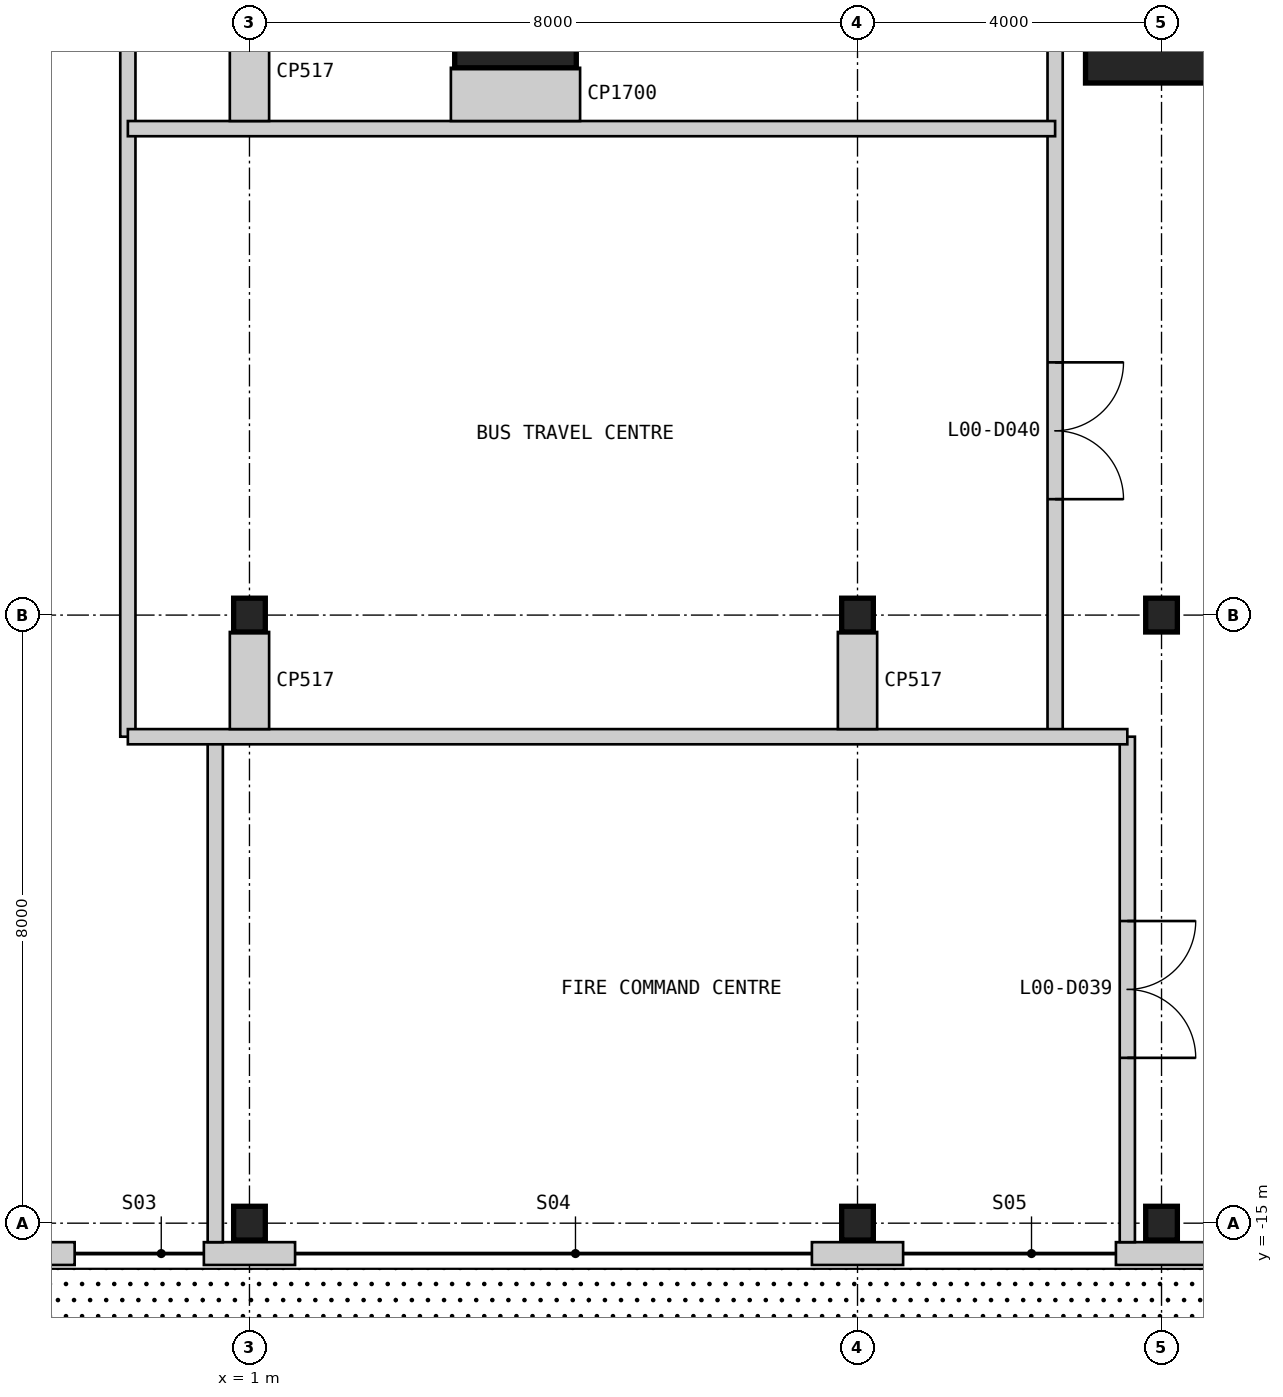
"""IFC4 building model, lengths in metres.
Left out: names, types, materials, properties, quantities, classifications, styles, units other than length and angle.
Written with IfcOpenShell. Run it as: python <this file> out.ifc"""

import sys

from ifc_helpers import new_model, si_unit, direction, frame, frame_2d, origin, origin_2d, place, context, subcontext, project, spatial, rectangle, i_section, extrude, element, fill, save


model = new_model("IFC4")
c1 = context("Model", 3, precision=1e-05, world=origin(), true_north=direction((0.0, 1.0)))
c2 = subcontext(c1, "Body", "Model", "MODEL_VIEW")
j1 = project(units=[si_unit("LENGTHUNIT", "METRE"), si_unit("PLANEANGLEUNIT", "RADIAN")], contexts=[c1])
p1 = place(None, origin())
s1 = spatial("IfcSite", under=j1, at=p1, CompositionType="ELEMENT")
p2 = place(p1, origin())
s2 = spatial("IfcBuilding", under=s1, at=p2, CompositionType="ELEMENT")
p3 = place(p2, origin())
s3 = spatial("IfcBuildingStorey", under=s2, at=p3, CompositionType="ELEMENT", Elevation=0.0)
p4 = place(p3, frame((4.5, 1.0, 0.0), z_axis=(0.0, 0.0, 1.0), x_axis=(1.0, 0.0, 0.0)))
e1 = element("IfcColumn", 1, at=p4, inside=s3, PredefinedType="COLUMN", context=c2, shape_type="SweptSolid", body=[
    extrude(rectangle(XDim=1.6, YDim=1.6, at=origin_2d()), origin(), (0.0, 0.0, 1.0), 7.0),
])
p5 = place(p3, frame((13.0, 1.0, 0.0), z_axis=(0.0, 0.0, 1.0), x_axis=(1.0, 0.0, 0.0)))
e2 = element("IfcColumn", 2, at=p5, inside=s3, PredefinedType="COLUMN", context=c2, shape_type="SweptSolid", body=[
    extrude(rectangle(XDim=2.0, YDim=2.0, at=origin_2d()), origin(), (0.0, 0.0, 1.0), 7.0),
])
p6 = place(p3, frame((1.0, -15.0, -0.3), z_axis=(0.0, 0.0, 1.0), x_axis=(1.0, 0.0, 0.0)))
e3 = element("IfcColumn", 3, at=p6, inside=s3, PredefinedType="COLUMN", context=c2, shape_type="SweptSolid", body=[
    extrude(i_section(OverallWidth=0.417, OverallDepth=0.445, WebThickness=0.039, FlangeThickness=0.063, at=origin_2d()), origin(), (0.0, 0.0, 1.0), 7.3),
])
p7 = place(p3, frame((1.0, -7.0, 0.0), z_axis=(0.0, 0.0, 1.0), x_axis=(1.0, 0.0, 0.0)))
e4 = element("IfcColumn", 4, at=p7, inside=s3, PredefinedType="COLUMN", context=c2, shape_type="SweptSolid", body=[
    extrude(i_section(OverallWidth=0.417, OverallDepth=0.445, WebThickness=0.039, FlangeThickness=0.063, at=origin_2d()), origin(), (0.0, 0.0, 1.0), 7.0),
])
p8 = place(p3, frame((9.0, -15.0, -0.3), z_axis=(0.0, 0.0, 1.0), x_axis=(1.0, 0.0, 0.0)))
e5 = element("IfcColumn", 5, at=p8, inside=s3, PredefinedType="COLUMN", context=c2, shape_type="SweptSolid", body=[
    extrude(i_section(OverallWidth=0.417, OverallDepth=0.445, WebThickness=0.039, FlangeThickness=0.063, at=origin_2d()), origin(), (0.0, 0.0, 1.0), 7.3),
])
p9 = place(p3, frame((9.0, -7.0, 0.0), z_axis=(0.0, 0.0, 1.0), x_axis=(1.0, 0.0, 0.0)))
e6 = element("IfcColumn", 6, at=p9, inside=s3, PredefinedType="COLUMN", context=c2, shape_type="SweptSolid", body=[
    extrude(i_section(OverallWidth=0.417, OverallDepth=0.445, WebThickness=0.039, FlangeThickness=0.063, at=origin_2d()), origin(), (0.0, 0.0, 1.0), 7.0),
])
p10 = place(p3, frame((13.0, -15.0, -0.3), z_axis=(0.0, 0.0, 1.0), x_axis=(1.0, 0.0, 0.0)))
e7 = element("IfcColumn", 7, at=p10, inside=s3, PredefinedType="COLUMN", context=c2, shape_type="SweptSolid", body=[
    extrude(i_section(OverallWidth=0.417, OverallDepth=0.445, WebThickness=0.039, FlangeThickness=0.063, at=origin_2d()), origin(), (0.0, 0.0, 1.0), 7.3),
])
p11 = place(p3, frame((13.0, -7.0, 0.0), z_axis=(0.0, 0.0, 1.0), x_axis=(1.0, 0.0, 0.0)))
e8 = element("IfcColumn", 8, at=p11, inside=s3, PredefinedType="COLUMN", context=c2, shape_type="SweptSolid", body=[
    extrude(i_section(OverallWidth=0.417, OverallDepth=0.445, WebThickness=0.039, FlangeThickness=0.063, at=origin_2d()), origin(), (0.0, 0.0, 1.0), 7.0),
])
p12 = place(p3, frame((-4.7, -15.4, 0.0), z_axis=(0.0, 0.0, 1.0), x_axis=(1.0, 0.0, 0.0)))
e9 = element("IfcWall", 9, at=p12, inside=s3, PredefinedType="SOLIDWALL", context=c2, shape_type="SweptSolid", body=[
    extrude(rectangle(XDim=3.4, YDim=0.3, at=frame_2d((1.7, 0.0))), origin(), (0.0, 0.0, 1.0), 6.7),
])
p13 = place(p12, frame((0.7, 0.0, 0.0)))
e10 = element("IfcOpeningElement", 10, at=p13, cuts=e9, PredefinedType="OPENING", context=c2, shape_type="SweptSolid", body=[
    extrude(rectangle(XDim=2.0, YDim=3.0, at=frame_2d((1.0, 1.5))), frame((0.0, 0.16, 0.0), z_axis=(0.0, -1.0, 0.0), x_axis=(1.0, 0.0, 0.0)), (0.0, 0.0, 1.0), 0.32),
])
for number, where, z_axis, x_axis in (
    (11, (0.4, -15.4, 0.0), (0.0, 0.0, 1.0), (1.0, 0.0, 0.0)),
    (12, (8.4, -15.4, 0.0), (0.0, 0.0, 1.0), (1.0, 0.0, 0.0)),
    (13, (12.4, -15.4, 0.0), (0.0, 0.0, 1.0), (1.0, 0.0, 0.0)),
):
    element("IfcWall", number, at=place(p3, frame(where, z_axis=z_axis, x_axis=x_axis)), inside=s3, PredefinedType="SOLIDWALL", context=c2, shape_type="SweptSolid", body=[
        extrude(rectangle(XDim=1.2, YDim=0.3, at=frame_2d((0.6, 0.0))), origin(), (0.0, 0.0, 1.0), 6.7),
    ])
p14 = place(p3, frame((-0.6, -8.6, 0.0), z_axis=(0.0, 0.0, 1.0), x_axis=(0.0, 1.0, 0.0)))
e14 = element("IfcWall", 14, at=p14, inside=s3, PredefinedType="PARTITIONING", context=c2, shape_type="SweptSolid", body=[
    extrude(rectangle(XDim=20.2, YDim=0.2, at=frame_2d((10.1, 0.0))), origin(), (0.0, 0.0, 1.0), 6.7),
])
p15 = place(p3, frame((0.55, -15.25, 0.0), z_axis=(0.0, 0.0, 1.0), x_axis=(0.0, 1.0, 0.0)))
e15 = element("IfcWall", 15, at=p15, inside=s3, PredefinedType="PARTITIONING", context=c2, shape_type="SweptSolid", body=[
    extrude(rectangle(XDim=6.65, YDim=0.2, at=frame_2d((3.325, 0.0))), origin(), (0.0, 0.0, 1.0), 6.7),
])
p16 = place(p3, frame((11.6, -8.6, 0.0), z_axis=(0.0, 0.0, 1.0), x_axis=(0.0, 1.0, 0.0)))
e16 = element("IfcWall", 16, at=p16, inside=s3, PredefinedType="PARTITIONING", context=c2, shape_type="SweptSolid", body=[
    extrude(rectangle(XDim=15.6, YDim=0.2, at=frame_2d((7.8, 0.0))), origin(), (0.0, 0.0, 1.0), 6.7),
])
p17 = place(p16, frame((3.125, 0.0, 0.0)))
e17 = element("IfcOpeningElement", 17, at=p17, cuts=e16, PredefinedType="OPENING", context=c2, shape_type="SweptSolid", body=[
    extrude(rectangle(XDim=1.8, YDim=2.4, at=frame_2d((0.9, 1.2))), frame((0.0, 0.11, 0.0), z_axis=(0.0, -1.0, 0.0), x_axis=(1.0, 0.0, 0.0)), (0.0, 0.0, 1.0), 0.22),
])
p18 = place(p16, frame((10.45, 0.0, 0.0)))
e18 = element("IfcOpeningElement", 18, at=p18, cuts=e16, PredefinedType="OPENING", context=c2, shape_type="SweptSolid", body=[
    extrude(rectangle(XDim=0.9, YDim=2.2, at=frame_2d((0.45, 1.1))), frame((0.0, 0.11, 0.0), z_axis=(0.0, -1.0, 0.0), x_axis=(1.0, 0.0, 0.0)), (0.0, 0.0, 1.0), 0.22),
])
p19 = place(p16, frame((13.225, 0.0, 0.0)))
e19 = element("IfcOpeningElement", 19, at=p19, cuts=e16, PredefinedType="OPENING", context=c2, shape_type="SweptSolid", body=[
    extrude(rectangle(XDim=0.9, YDim=2.2, at=frame_2d((0.45, 1.1))), frame((0.0, 0.11, 0.0), z_axis=(0.0, -1.0, 0.0), x_axis=(1.0, 0.0, 0.0)), (0.0, 0.0, 1.0), 0.22),
])
p20 = place(p3, frame((12.55, -15.25, 0.0), z_axis=(0.0, 0.0, 1.0), x_axis=(0.0, 1.0, 0.0)))
e20 = element("IfcWall", 20, at=p20, inside=s3, PredefinedType="PARTITIONING", context=c2, shape_type="SweptSolid", body=[
    extrude(rectangle(XDim=6.65, YDim=0.2, at=frame_2d((3.325, 0.0))), origin(), (0.0, 0.0, 1.0), 6.7),
])
p21 = place(p20, frame((2.425, 0.0, 0.0)))
e21 = element("IfcOpeningElement", 21, at=p21, cuts=e20, PredefinedType="OPENING", context=c2, shape_type="SweptSolid", body=[
    extrude(rectangle(XDim=1.8, YDim=2.4, at=frame_2d((0.9, 1.2))), frame((0.0, 0.11, 0.0), z_axis=(0.0, -1.0, 0.0), x_axis=(1.0, 0.0, 0.0)), (0.0, 0.0, 1.0), 0.22),
])
p22 = place(p3, frame((-0.6, -8.6, 0.0), z_axis=(0.0, 0.0, 1.0), x_axis=(1.0, 0.0, 0.0)))
e22 = element("IfcWall", 22, at=p22, inside=s3, PredefinedType="PARTITIONING", context=c2, shape_type="SweptSolid", body=[
    extrude(rectangle(XDim=13.15, YDim=0.2, at=frame_2d((6.575, 0.0))), origin(), (0.0, 0.0, 1.0), 6.7),
])
p23 = place(p3, frame((-0.6, -0.6, 0.0), z_axis=(0.0, 0.0, 1.0), x_axis=(1.0, 0.0, 0.0)))
e23 = element("IfcWall", 23, at=p23, inside=s3, PredefinedType="PARTITIONING", context=c2, shape_type="SweptSolid", body=[
    extrude(rectangle(XDim=12.2, YDim=0.2, at=frame_2d((6.1, 0.0))), origin(), (0.0, 0.0, 1.0), 6.7),
])
for number, where, z_axis, x_axis in (
    (24, (1.0, -8.5, 0.0), (0.0, 0.0, 1.0), (0.0, 1.0, 0.0)),
    (25, (9.0, -8.5, 0.0), (0.0, 0.0, 1.0), (0.0, 1.0, 0.0)),
):
    element("IfcWall", number, at=place(p3, frame(where, z_axis=z_axis, x_axis=x_axis)), inside=s3, PredefinedType="PARTITIONING", context=c2, shape_type="SweptSolid", body=[
        extrude(rectangle(XDim=1.278, YDim=0.517, at=frame_2d((0.639, 0.0))), origin(), (0.0, 0.0, 1.0), 5.954),
    ])
p24 = place(p3, frame((4.5, -0.5, 0.0), z_axis=(0.0, 0.0, 1.0), x_axis=(0.0, 1.0, 0.0)))
e26 = element("IfcWall", 26, at=p24, inside=s3, PredefinedType="PARTITIONING", context=c2, shape_type="SweptSolid", body=[
    extrude(rectangle(XDim=0.7, YDim=1.7, at=frame_2d((0.35, 0.0))), origin(), (0.0, 0.0, 1.0), 6.7),
])
p25 = place(p3, frame((1.0, -0.5, 0.0), z_axis=(0.0, 0.0, 1.0), x_axis=(0.0, 1.0, 0.0)))
e27 = element("IfcWall", 27, at=p25, inside=s3, PredefinedType="PARTITIONING", context=c2, shape_type="SweptSolid", body=[
    extrude(rectangle(XDim=1.278, YDim=0.517, at=frame_2d((0.639, 0.0))), origin(), (0.0, 0.0, 1.0), 5.954),
])
p26 = place(p21, frame((1.8, 0.0, 0.0), z_axis=(0.0, 0.0, 1.0), x_axis=(-1.0, 0.0, 0.0)))
e28 = element("IfcDoor", 28, at=p26, inside=s3, OperationType="DOUBLE_DOOR_SINGLE_SWING", PredefinedType="DOOR", context=c2, shape_type="SweptSolid", body=[
    extrude(rectangle(XDim=1.8, YDim=2.4, at=frame_2d((0.9, 1.2))), frame((0.0, 0.025, 0.0), z_axis=(0.0, -1.0, 0.0), x_axis=(1.0, 0.0, 0.0)), (0.0, 0.0, 1.0), 0.05),
])
fill(e21, e28)
p27 = place(p17, frame((1.8, 0.0, 0.0), z_axis=(0.0, 0.0, 1.0), x_axis=(-1.0, 0.0, 0.0)))
e29 = element("IfcDoor", 29, at=p27, inside=s3, OperationType="DOUBLE_DOOR_SINGLE_SWING", PredefinedType="DOOR", context=c2, shape_type="SweptSolid", body=[
    extrude(rectangle(XDim=1.8, YDim=2.4, at=frame_2d((0.9, 1.2))), frame((0.0, 0.025, 0.0), z_axis=(0.0, -1.0, 0.0), x_axis=(1.0, 0.0, 0.0)), (0.0, 0.0, 1.0), 0.05),
])
fill(e17, e29)
save(model, sys.argv[1])
